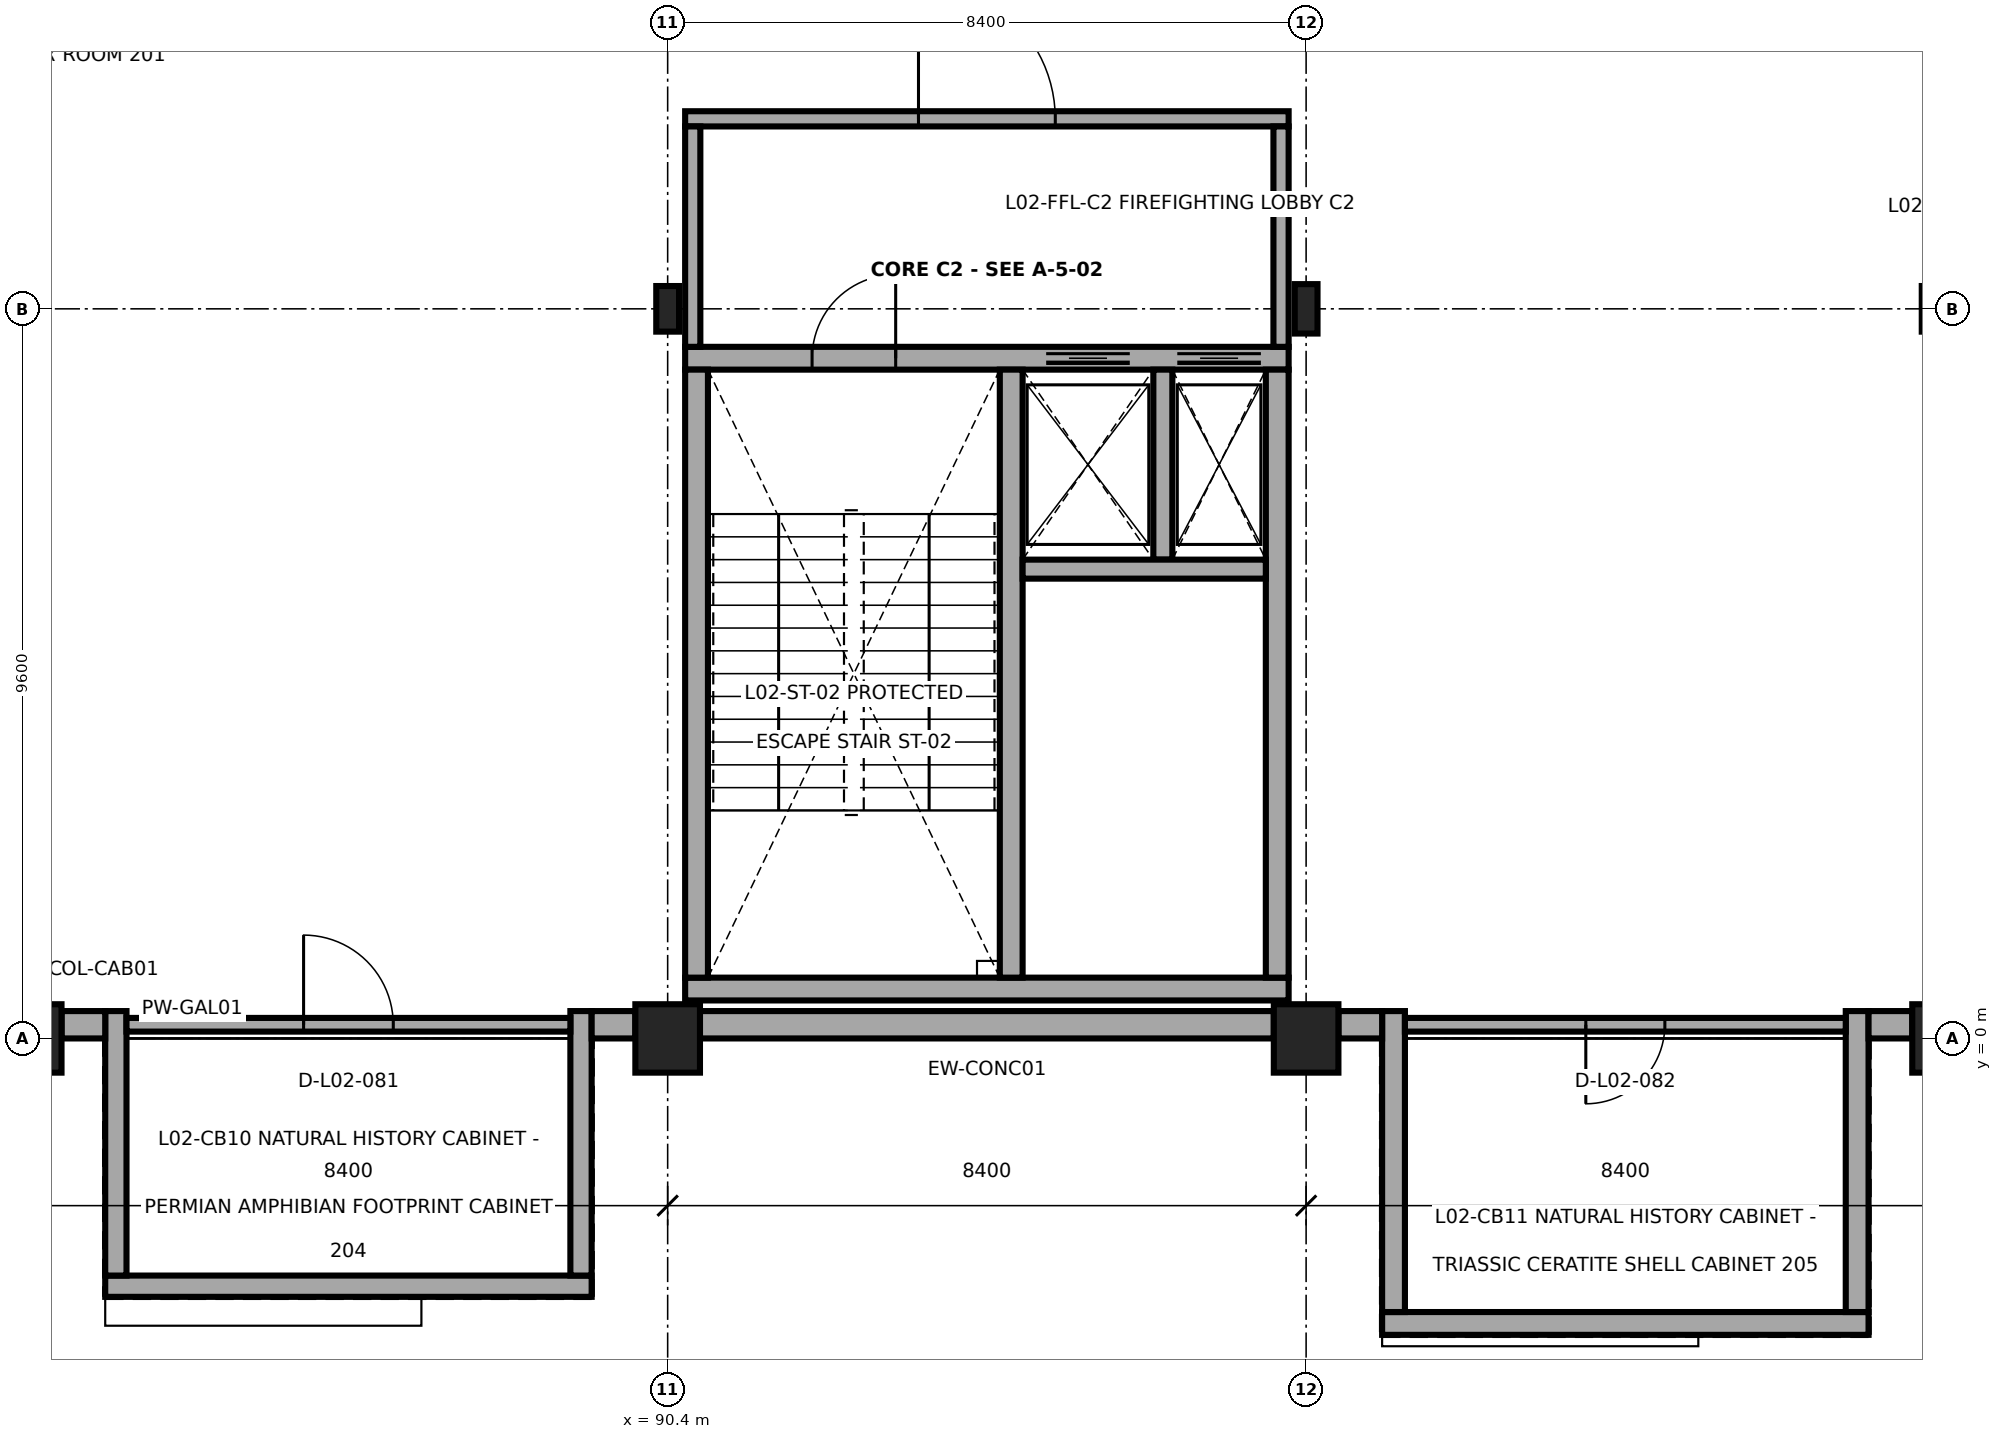
"""IFC4 building model, lengths in metres.
Left out: names, types, materials, properties, quantities, classifications, styles, units other than length and angle.
Written with IfcOpenShell. Run it as: python <this file> out.ifc"""

import sys

from ifc_helpers import new_model, si_unit, direction, frame, frame_2d, origin, origin_2d, place, context, subcontext, project, spatial, rectangle, i_section, extrude, element, fill, save


model = new_model("IFC4")
c1 = context("Model", 3, precision=1e-05, world=origin(), true_north=direction((0.0, 1.0)))
c2 = subcontext(c1, "Body", "Model", "MODEL_VIEW")
j1 = project(units=[si_unit("LENGTHUNIT", "METRE"), si_unit("PLANEANGLEUNIT", "RADIAN")], contexts=[c1])
p1 = place(None, origin())
s1 = spatial("IfcSite", under=j1, at=p1, CompositionType="ELEMENT")
p2 = place(p1, origin())
s2 = spatial("IfcBuilding", under=s1, at=p2, CompositionType="ELEMENT")
p3 = place(p2, frame((0.0, 0.0, 12.9)))
s3 = spatial("IfcBuildingStorey", under=s2, at=p3, CompositionType="ELEMENT", Elevation=12.9)
for number, where, z_axis, x_axis in (
    (1, (82.0, 0.0, 0.0), (0.0, 0.0, 1.0), (1.0, 0.0, 0.0)),
    (2, (90.4, 0.0, 0.0), (0.0, 0.0, 1.0), (1.0, 0.0, 0.0)),
):
    element("IfcColumn", number, at=place(p3, frame(where, z_axis=z_axis, x_axis=x_axis)), inside=s3, PredefinedType="COLUMN", context=c2, shape_type="SweptSolid", body=[
        extrude(rectangle(XDim=0.85, YDim=0.9, at=origin_2d()), origin(), (0.0, 0.0, 1.0), 4.5),
    ])
p4 = place(p3, frame((90.4, 9.6, 0.0), z_axis=(0.0, 0.0, 1.0), x_axis=(1.0, 0.0, 0.0)))
e3 = element("IfcColumn", 3, at=p4, inside=s3, PredefinedType="COLUMN", context=c2, shape_type="SweptSolid", body=[
    extrude(i_section(OverallWidth=0.3, OverallDepth=0.6, WebThickness=0.015, FlangeThickness=0.03, FilletRadius=0.027, at=origin_2d()), origin(), (0.0, 0.0, 1.0), 4.5),
])
p5 = place(p3, frame((98.8, 0.0, 0.0), z_axis=(0.0, 0.0, 1.0), x_axis=(1.0, 0.0, 0.0)))
e4 = element("IfcColumn", 4, at=p5, inside=s3, PredefinedType="COLUMN", context=c2, shape_type="SweptSolid", body=[
    extrude(rectangle(XDim=0.85, YDim=0.9, at=origin_2d()), origin(), (0.0, 0.0, 1.0), 4.5),
])
p6 = place(p3, frame((98.8, 9.6, 0.0), z_axis=(0.0, 0.0, 1.0), x_axis=(1.0, 0.0, 0.0)))
e5 = element("IfcColumn", 5, at=p6, inside=s3, PredefinedType="COLUMN", context=c2, shape_type="SweptSolid", body=[
    extrude(i_section(OverallWidth=0.3, OverallDepth=0.65, WebThickness=0.016, FlangeThickness=0.031, FilletRadius=0.027, at=origin_2d()), origin(), (0.0, 0.0, 1.0), 4.5),
])
p7 = place(p3, frame((107.2, 0.0, 0.0), z_axis=(0.0, 0.0, 1.0), x_axis=(1.0, 0.0, 0.0)))
e6 = element("IfcColumn", 6, at=p7, inside=s3, PredefinedType="COLUMN", context=c2, shape_type="SweptSolid", body=[
    extrude(rectangle(XDim=0.85, YDim=0.9, at=origin_2d()), origin(), (0.0, 0.0, 1.0), 4.5),
])
p8 = place(p3, frame((83.0, -3.26, 0.0), z_axis=(0.0, 0.0, 1.0), x_axis=(1.0, 0.0, 0.0)))
e7 = element("IfcWall", 7, at=p8, inside=s3, PredefinedType="SOLIDWALL", context=c2, shape_type="SweptSolid", body=[
    extrude(rectangle(XDim=6.4, YDim=0.28, at=frame_2d((3.2, 0.0))), origin(), (0.0, 0.0, 1.0), 2.99),
])
for number, where, z_axis, x_axis in (
    (8, (83.14, 0.36, 0.0), (0.0, 0.0, 1.0), (0.0, -1.0, 0.0)),
    (9, (89.26, -3.12, 0.0), (0.0, 0.0, 1.0), (0.0, 1.0, 0.0)),
):
    element("IfcWall", number, at=place(p3, frame(where, z_axis=z_axis, x_axis=x_axis)), inside=s3, PredefinedType="SOLIDWALL", context=c2, shape_type="SweptSolid", body=[
        extrude(rectangle(XDim=3.48, YDim=0.28, at=frame_2d((1.74, 0.0))), origin(), (0.0, 0.0, 1.0), 2.99),
    ])
p9 = place(p3, frame((99.8, -3.75, 0.0), z_axis=(0.0, 0.0, 1.0), x_axis=(1.0, 0.0, 0.0)))
e10 = element("IfcWall", 10, at=p9, inside=s3, PredefinedType="SOLIDWALL", context=c2, shape_type="SweptSolid", body=[
    extrude(rectangle(XDim=6.4, YDim=0.3, at=frame_2d((3.2, 0.0))), origin(), (0.0, 0.0, 1.0), 2.99),
])
for number, where, z_axis, x_axis in (
    (11, (99.95, 0.36, 0.0), (0.0, 0.0, 1.0), (0.0, -1.0, 0.0)),
    (12, (106.05, -3.6, 0.0), (0.0, 0.0, 1.0), (0.0, 1.0, 0.0)),
):
    element("IfcWall", number, at=place(p3, frame(where, z_axis=z_axis, x_axis=x_axis)), inside=s3, PredefinedType="SOLIDWALL", context=c2, shape_type="SweptSolid", body=[
        extrude(rectangle(XDim=3.96, YDim=0.3, at=frame_2d((1.98, 0.0))), origin(), (0.0, 0.0, 1.0), 2.99),
    ])
p10 = place(p3, frame((82.425, 0.18, 0.0), z_axis=(0.0, 0.0, 1.0), x_axis=(1.0, 0.0, 0.0)))
e13 = element("IfcWall", 13, at=p10, inside=s3, PredefinedType="SOLIDWALL", context=c2, shape_type="SweptSolid", body=[
    extrude(rectangle(XDim=0.575, YDim=0.36, at=frame_2d((0.288, 0.0))), origin(), (0.0, 0.0, 1.0), 3.335),
])
p11 = place(p3, frame((89.4, 0.18, 0.0), z_axis=(0.0, 0.0, 1.0), x_axis=(1.0, 0.0, 0.0)))
e14 = element("IfcWall", 14, at=p11, inside=s3, PredefinedType="SOLIDWALL", context=c2, shape_type="SweptSolid", body=[
    extrude(rectangle(XDim=0.575, YDim=0.36, at=frame_2d((0.288, 0.0))), origin(), (0.0, 0.0, 1.0), 3.335),
])
p12 = place(p3, frame((90.825, 0.18, 0.0), z_axis=(0.0, 0.0, 1.0), x_axis=(1.0, 0.0, 0.0)))
e15 = element("IfcWall", 15, at=p12, inside=s3, PredefinedType="SOLIDWALL", context=c2, shape_type="SweptSolid", body=[
    extrude(rectangle(XDim=7.55, YDim=0.36, at=frame_2d((3.775, 0.0))), origin(), (0.0, 0.0, 1.0), 3.335),
])
for number, where, z_axis, x_axis in (
    (16, (99.225, 0.18, 0.0), (0.0, 0.0, 1.0), (1.0, 0.0, 0.0)),
    (17, (106.2, 0.18, 0.0), (0.0, 0.0, 1.0), (1.0, 0.0, 0.0)),
):
    element("IfcWall", number, at=place(p3, frame(where, z_axis=z_axis, x_axis=x_axis)), inside=s3, PredefinedType="SOLIDWALL", context=c2, shape_type="SweptSolid", body=[
        extrude(rectangle(XDim=0.575, YDim=0.36, at=frame_2d((0.288, 0.0))), origin(), (0.0, 0.0, 1.0), 3.335),
    ])
p13 = place(p3, frame((90.63, 0.65, 0.0), z_axis=(0.0, 0.0, 1.0), x_axis=(1.0, 0.0, 0.0)))
e18 = element("IfcWall", 18, at=p13, inside=s3, PredefinedType="SHEAR", context=c2, shape_type="SweptSolid", body=[
    extrude(rectangle(XDim=7.94, YDim=0.3, at=frame_2d((3.97, 0.0))), origin(), (0.0, 0.0, 1.0), 4.25),
])
p14 = place(p3, frame((98.57, 8.95, 0.0), z_axis=(0.0, 0.0, 1.0), x_axis=(-1.0, 0.0, 0.0)))
e19 = element("IfcWall", 19, at=p14, inside=s3, PredefinedType="SHEAR", context=c2, shape_type="SweptSolid", body=[
    extrude(rectangle(XDim=7.94, YDim=0.3, at=frame_2d((3.97, 0.0))), origin(), (0.0, 0.0, 1.0), 4.25),
])
p15 = place(p14, frame((5.17, 0.0, 0.0)))
e20 = element("IfcOpeningElement", 20, at=p15, cuts=e19, PredefinedType="OPENING", context=c2, shape_type="SweptSolid", body=[
    extrude(rectangle(XDim=1.1, YDim=2.2, at=frame_2d((0.55, 1.1))), frame((0.0, 0.16, 0.0), z_axis=(0.0, -1.0, 0.0), x_axis=(1.0, 0.0, 0.0)), (0.0, 0.0, 1.0), 0.32),
])
p16 = place(p14, frame((2.09, 0.0, 0.0)))
e21 = element("IfcOpeningElement", 21, at=p16, cuts=e19, PredefinedType="OPENING", context=c2, shape_type="SweptSolid", body=[
    extrude(rectangle(XDim=1.1, YDim=2.1, at=frame_2d((0.55, 1.05))), frame((0.0, 0.16, 0.0), z_axis=(0.0, -1.0, 0.0), x_axis=(1.0, 0.0, 0.0)), (0.0, 0.0, 1.0), 0.32),
])
p17 = place(p14, frame((0.365, 0.0, 0.0)))
e22 = element("IfcOpeningElement", 22, at=p17, cuts=e19, PredefinedType="OPENING", context=c2, shape_type="SweptSolid", body=[
    extrude(rectangle(XDim=1.1, YDim=2.1, at=frame_2d((0.55, 1.05))), frame((0.0, 0.16, 0.0), z_axis=(0.0, -1.0, 0.0), x_axis=(1.0, 0.0, 0.0)), (0.0, 0.0, 1.0), 0.32),
])
for number, where, z_axis, x_axis in (
    (23, (90.78, 8.8, 0.0), (0.0, 0.0, 1.0), (0.0, -1.0, 0.0)),
    (24, (98.42, 0.8, 0.0), (0.0, 0.0, 1.0), (0.0, 1.0, 0.0)),
    (25, (94.92, 0.8, 0.0), (0.0, 0.0, 1.0), (0.0, 1.0, 0.0)),
):
    element("IfcWall", number, at=place(p3, frame(where, z_axis=z_axis, x_axis=x_axis)), inside=s3, PredefinedType="SHEAR", context=c2, shape_type="SweptSolid", body=[
        extrude(rectangle(XDim=8.0, YDim=0.3, at=frame_2d((4.0, 0.0))), origin(), (0.0, 0.0, 1.0), 4.25),
    ])
p18 = place(p3, frame((96.915, 6.3, 0.0), z_axis=(0.0, 0.0, 1.0), x_axis=(0.0, 1.0, 0.0)))
e26 = element("IfcWall", 26, at=p18, inside=s3, PredefinedType="SHEAR", context=c2, shape_type="SweptSolid", body=[
    extrude(rectangle(XDim=2.5, YDim=0.25, at=frame_2d((1.25, 0.0))), origin(), (0.0, 0.0, 1.0), 4.25),
])
p19 = place(p3, frame((95.07, 6.175, 0.0), z_axis=(0.0, 0.0, 1.0), x_axis=(1.0, 0.0, 0.0)))
e27 = element("IfcWall", 27, at=p19, inside=s3, PredefinedType="SHEAR", context=c2, shape_type="SweptSolid", body=[
    extrude(rectangle(XDim=3.2, YDim=0.25, at=frame_2d((1.6, 0.0))), origin(), (0.0, 0.0, 1.0), 4.25),
])
p20 = place(p3, frame((90.63, 12.1, 0.0), z_axis=(0.0, 0.0, 1.0), x_axis=(1.0, 0.0, 0.0)))
e28 = element("IfcWall", 28, at=p20, inside=s3, PredefinedType="SOLIDWALL", context=c2, shape_type="SweptSolid", body=[
    extrude(rectangle(XDim=7.94, YDim=0.2, at=frame_2d((3.97, 0.0))), origin(), (0.0, 0.0, 1.0), 3.902),
])
p21 = place(p20, frame((3.07, 0.0, 0.0)))
e29 = element("IfcOpeningElement", 29, at=p21, cuts=e28, PredefinedType="OPENING", context=c2, shape_type="SweptSolid", body=[
    extrude(rectangle(XDim=1.8, YDim=2.2, at=frame_2d((0.9, 1.1))), frame((0.0, 0.11, 0.0), z_axis=(0.0, -1.0, 0.0), x_axis=(1.0, 0.0, 0.0)), (0.0, 0.0, 1.0), 0.22),
])
for number, where, z_axis, x_axis in (
    (30, (90.73, 9.1, 0.0), (0.0, 0.0, 1.0), (0.0, 1.0, 0.0)),
    (31, (98.47, 12.0, 0.0), (0.0, 0.0, 1.0), (0.0, -1.0, 0.0)),
):
    element("IfcWall", number, at=place(p3, frame(where, z_axis=z_axis, x_axis=x_axis)), inside=s3, PredefinedType="SOLIDWALL", context=c2, shape_type="SweptSolid", body=[
        extrude(rectangle(XDim=2.9, YDim=0.2, at=frame_2d((1.45, 0.0))), origin(), (0.0, 0.0, 1.0), 3.642),
    ])
p22 = place(p3, frame((83.28, 0.18, 0.0), z_axis=(0.0, 0.0, 1.0), x_axis=(1.0, 0.0, 0.0)))
e32 = element("IfcWall", 32, at=p22, inside=s3, PredefinedType="PARTITIONING", context=c2, shape_type="SweptSolid", body=[
    extrude(rectangle(XDim=5.84, YDim=0.18, at=frame_2d((2.92, 0.0))), origin(), (0.0, 0.0, 1.0), 2.99),
])
p23 = place(p22, frame((2.33, 0.0, 0.0)))
e33 = element("IfcOpeningElement", 33, at=p23, cuts=e32, PredefinedType="OPENING", context=c2, shape_type="SweptSolid", body=[
    extrude(rectangle(XDim=1.18, YDim=2.25, at=frame_2d((0.59, 1.125))), frame((0.0, 0.1, 0.0), z_axis=(0.0, -1.0, 0.0), x_axis=(1.0, 0.0, 0.0)), (0.0, 0.0, 1.0), 0.2),
])
p24 = place(p3, frame((100.1, 0.18, 0.0), z_axis=(0.0, 0.0, 1.0), x_axis=(1.0, 0.0, 0.0)))
e34 = element("IfcWall", 34, at=p24, inside=s3, PredefinedType="PARTITIONING", context=c2, shape_type="SweptSolid", body=[
    extrude(rectangle(XDim=5.8, YDim=0.18, at=frame_2d((2.9, 0.0))), origin(), (0.0, 0.0, 1.0), 2.99),
])
p25 = place(p24, frame((2.38, 0.0, 0.0)))
e35 = element("IfcOpeningElement", 35, at=p25, cuts=e34, PredefinedType="OPENING", context=c2, shape_type="SweptSolid", body=[
    extrude(rectangle(XDim=1.04, YDim=2.18, at=frame_2d((0.52, 1.09))), frame((0.0, 0.1, 0.0), z_axis=(0.0, -1.0, 0.0), x_axis=(1.0, 0.0, 0.0)), (0.0, 0.0, 1.0), 0.2),
])
p26 = place(p15, origin())
e36 = element("IfcDoor", 36, at=p26, inside=s3, OperationType="SINGLE_SWING_RIGHT", PredefinedType="DOOR", context=c2, shape_type="SweptSolid", body=[
    extrude(rectangle(XDim=1.1, YDim=2.2, at=frame_2d((0.55, 1.1))), frame((0.0, 0.025, 0.0), z_axis=(0.0, -1.0, 0.0), x_axis=(1.0, 0.0, 0.0)), (0.0, 0.0, 1.0), 0.05),
])
fill(e20, e36)
p27 = place(p16, origin())
e37 = element("IfcDoor", 37, at=p27, inside=s3, OperationType="SLIDING_TO_LEFT", PredefinedType="DOOR", context=c2, shape_type="SweptSolid", body=[
    extrude(rectangle(XDim=1.1, YDim=2.1, at=frame_2d((0.55, 1.05))), frame((0.0, 0.025, 0.0), z_axis=(0.0, -1.0, 0.0), x_axis=(1.0, 0.0, 0.0)), (0.0, 0.0, 1.0), 0.05),
])
fill(e21, e37)
p28 = place(p17, origin())
e38 = element("IfcDoor", 38, at=p28, inside=s3, OperationType="SLIDING_TO_LEFT", PredefinedType="DOOR", context=c2, shape_type="SweptSolid", body=[
    extrude(rectangle(XDim=1.1, YDim=2.1, at=frame_2d((0.55, 1.05))), frame((0.0, 0.025, 0.0), z_axis=(0.0, -1.0, 0.0), x_axis=(1.0, 0.0, 0.0)), (0.0, 0.0, 1.0), 0.05),
])
fill(e22, e38)
p29 = place(p21, origin())
e39 = element("IfcDoor", 39, at=p29, inside=s3, OperationType="DOUBLE_DOOR_SINGLE_SWING", PredefinedType="DOOR", context=c2, shape_type="SweptSolid", body=[
    extrude(rectangle(XDim=1.8, YDim=2.2, at=frame_2d((0.9, 1.1))), frame((0.0, 0.025, 0.0), z_axis=(0.0, -1.0, 0.0), x_axis=(1.0, 0.0, 0.0)), (0.0, 0.0, 1.0), 0.05),
])
fill(e29, e39)
p30 = place(p23, origin())
e40 = element("IfcDoor", 40, at=p30, inside=s3, OperationType="SINGLE_SWING_LEFT", PredefinedType="DOOR", context=c2, shape_type="SweptSolid", body=[
    extrude(rectangle(XDim=1.18, YDim=2.25, at=frame_2d((0.59, 1.125))), frame((0.0, 0.025, 0.0), z_axis=(0.0, -1.0, 0.0), x_axis=(1.0, 0.0, 0.0)), (0.0, 0.0, 1.0), 0.05),
])
fill(e33, e40)
p31 = place(p25, origin())
e41 = element("IfcDoor", 41, at=p31, inside=s3, OperationType="SINGLE_SWING_RIGHT", PredefinedType="DOOR", context=c2, shape_type="SweptSolid", body=[
    extrude(rectangle(XDim=1.04, YDim=2.18, at=frame_2d((0.52, 1.09))), frame((0.0, 0.025, 0.0), z_axis=(0.0, -1.0, 0.0), x_axis=(1.0, 0.0, 0.0)), (0.0, 0.0, 1.0), 0.05),
])
fill(e35, e41)
save(model, sys.argv[1])
